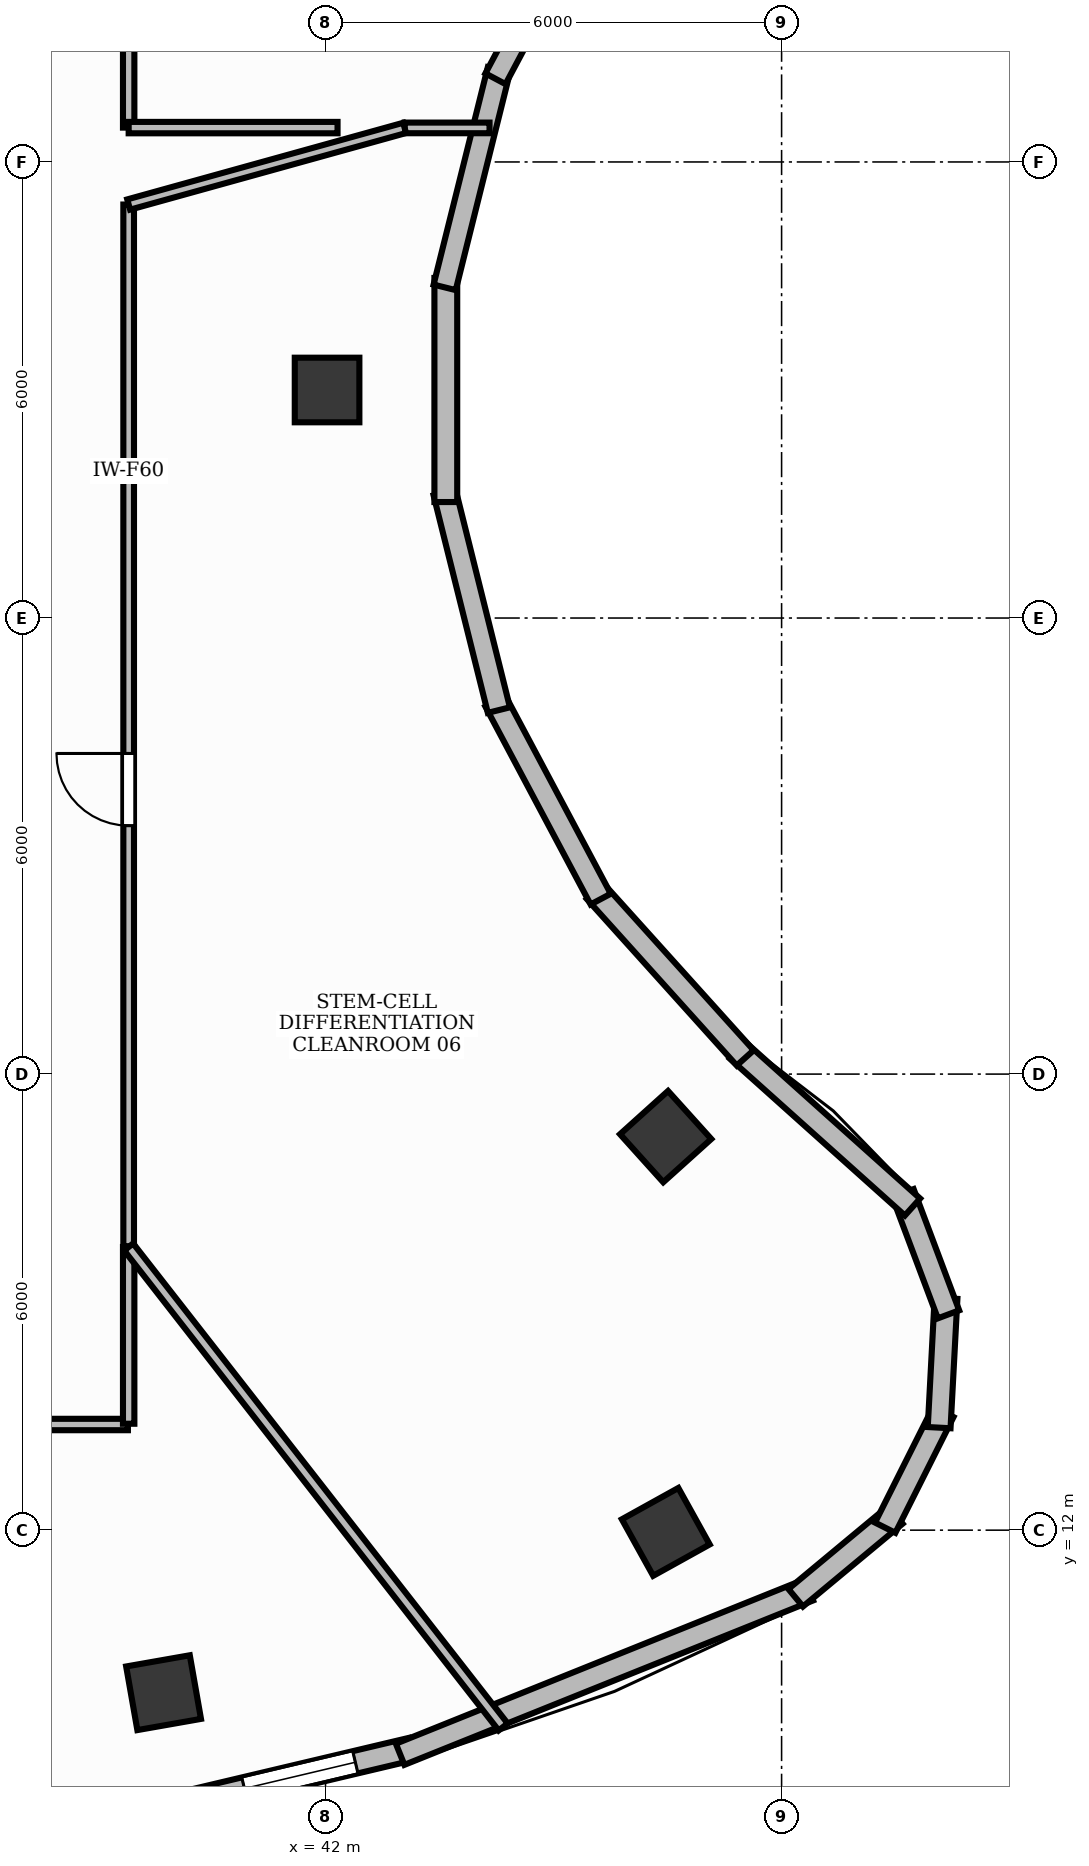
"""IFC4 building model, lengths in metres.
Left out: names, types, materials, properties, quantities, classifications, styles, units other than length and angle.
Written with IfcOpenShell. Run it as: python <this file> out.ifc"""

import sys

from ifc_helpers import new_model, si_unit, direction, frame, frame_2d, origin, origin_2d, place, context, subcontext, project, spatial, rectangle, extrude, element, fill, save


model = new_model("IFC4")
c1 = context("Model", 3, precision=1e-05, world=origin(), true_north=direction((0.0, 1.0)))
c2 = subcontext(c1, "Body", "Model", "MODEL_VIEW")
j1 = project(units=[si_unit("LENGTHUNIT", "METRE"), si_unit("PLANEANGLEUNIT", "RADIAN")], contexts=[c1])
p1 = place(None, origin())
s1 = spatial("IfcSite", under=j1, at=p1, CompositionType="ELEMENT")
p2 = place(p1, origin())
s2 = spatial("IfcBuilding", under=s1, at=p2, CompositionType="ELEMENT")
p3 = place(p2, frame((0.0, 0.0, 286.8)))
s3 = spatial("IfcBuildingStorey", under=s2, at=p3, CompositionType="ELEMENT", Elevation=286.8)
for number, where, z_axis, x_axis in (
    (1, (39.869, 9.862, -0.0), (0.0, 0.0, 1.0), (0.985, 0.173, 0.0)),
    (2, (46.476, 11.977, -0.0), (0.0, 0.0, 1.0), (0.875, 0.485, 0.0)),
    (3, (46.475, 17.177, -0.0), (0.0, 0.0, 1.0), (-0.669, 0.743, 0.0)),
    (4, (42.02, 27.0, -0.0), (0.0, 0.0, 1.0), (0.0, 1.0, 0.0)),
):
    element("IfcColumn", number, at=place(p3, frame(where, z_axis=z_axis, x_axis=x_axis)), inside=s3, PredefinedType="COLUMN", context=c2, shape_type="SweptSolid", body=[
        extrude(rectangle(XDim=0.85, YDim=0.85, at=origin_2d()), origin(), (0.0, 0.0, 1.0), 3.901),
    ])
p4 = place(p3, frame((40.196, 8.427, 0.0), z_axis=(0.0, 0.0, 1.0), x_axis=(0.9731008332, 0.230379618079, 0.0)))
e5 = element("IfcWall", 5, at=p4, inside=s3, PredefinedType="STANDARD", context=c2, shape_type="SweptSolid", body=[
    extrude(rectangle(XDim=3.015, YDim=0.3, at=frame_2d((1.507, 0.0))), origin(), (0.0, 0.0, 1.0), 3.9),
])
p5 = place(p4, frame((0.758, 0.0, 0.95)))
e6 = element("IfcOpeningElement", 6, at=p5, cuts=e5, PredefinedType="OPENING", context=c2, shape_type="SweptSolid", body=[
    extrude(rectangle(XDim=1.5, YDim=1.8, at=frame_2d((0.75, 0.9))), frame((0.0, 0.165, 0.0), z_axis=(0.0, -1.0, 0.0), x_axis=(1.0, 0.0, 0.0)), (0.0, 0.0, 1.0), 0.33),
])
p6 = place(p3, frame((42.981, 9.052, 0.0), z_axis=(0.0, 0.0, 1.0), x_axis=(0.927771967192, 0.373147660978, 0.0)))
e7 = element("IfcWall", 7, at=p6, inside=s3, PredefinedType="STANDARD", context=c2, shape_type="SweptSolid", body=[
    extrude(rectangle(XDim=5.796, YDim=0.3, at=frame_2d((2.898, 0.0))), origin(), (0.0, 0.0, 1.0), 3.9),
])
for number, where, z_axis, x_axis in (
    (8, (48.185, 11.111, 0.0), (0.0, 0.0, 1.0), (0.769, 0.639, 0.0)),
    (9, (49.363, 12.032, 0.0), (0.0, 0.0, 1.0), (0.449, 0.894, 0.0)),
):
    element("IfcWall", number, at=place(p3, frame(where, z_axis=z_axis, x_axis=x_axis)), inside=s3, PredefinedType="STANDARD", context=c2, shape_type="SweptSolid", body=[
        extrude(rectangle(XDim=1.704, YDim=0.3, at=frame_2d((0.852, 0.0))), origin(), (0.0, 0.0, 1.0), 3.9),
    ])
for number, where, z_axis, x_axis in (
    (10, (50.073, 13.349, 0.0), (0.0, 0.0, 1.0), (0.053, 0.999, 0.0)),
    (11, (50.196, 14.839, 0.0), (0.0, 0.0, 1.0), (-0.351, 0.936, 0.0)),
):
    element("IfcWall", number, at=place(p3, frame(where, z_axis=z_axis, x_axis=x_axis)), inside=s3, PredefinedType="STANDARD", context=c2, shape_type="SweptSolid", body=[
        extrude(rectangle(XDim=1.704, YDim=0.3, at=frame_2d((0.852, 0.0))), origin(), (0.0, 0.0, 1.0), 3.9),
    ])
p7 = place(p3, frame((49.722, 16.251, 0.0), z_axis=(0.0, 0.0, 1.0), x_axis=(-0.744720921046, 0.667376018266, 0.0)))
e12 = element("IfcWall", 12, at=p7, inside=s3, PredefinedType="STANDARD", context=c2, shape_type="SweptSolid", body=[
    extrude(rectangle(XDim=3.094, YDim=0.3, at=frame_2d((1.547, 0.0))), origin(), (0.0, 0.0, 1.0), 3.9),
])
p8 = place(p3, frame((47.521, 18.213, 0.0), z_axis=(0.0, 0.0, 1.0), x_axis=(-0.669166006669, 0.743112949368, 0.0)))
e13 = element("IfcWall", 13, at=p8, inside=s3, PredefinedType="STANDARD", context=c2, shape_type="SweptSolid", body=[
    extrude(rectangle(XDim=2.948, YDim=0.3, at=frame_2d((1.474, 0.0))), origin(), (0.0, 0.0, 1.0), 3.9),
])
p9 = place(p3, frame((45.62, 20.302, 0.0), z_axis=(0.0, 0.0, 1.0), x_axis=(-0.469466013123, 0.882950543644, 0.0)))
e14 = element("IfcWall", 14, at=p9, inside=s3, PredefinedType="STANDARD", context=c2, shape_type="SweptSolid", body=[
    extrude(rectangle(XDim=2.948, YDim=0.3, at=frame_2d((1.474, 0.0))), origin(), (0.0, 0.0, 1.0), 2.625),
])
p10 = place(p3, frame((44.281, 22.789, 0.0), z_axis=(0.0, 0.0, 1.0), x_axis=(-0.24195108751, 0.970288447449, 0.0)))
e15 = element("IfcWall", 15, at=p10, inside=s3, PredefinedType="STANDARD", context=c2, shape_type="SweptSolid", body=[
    extrude(rectangle(XDim=2.948, YDim=0.3, at=frame_2d((1.474, 0.0))), origin(), (0.0, 0.0, 1.0), 2.625),
])
p11 = place(p3, frame((43.583, 25.526, 0.0), z_axis=(0.0, 0.0, 1.0), x_axis=(0.0, 1.0, 0.0)))
e16 = element("IfcWall", 16, at=p11, inside=s3, PredefinedType="STANDARD", context=c2, shape_type="SweptSolid", body=[
    extrude(rectangle(XDim=2.948, YDim=0.3, at=frame_2d((1.474, 0.0))), origin(), (0.0, 0.0, 1.0), 3.9),
])
p12 = place(p3, frame((43.567, 28.35, 0.0), z_axis=(0.0, 0.0, 1.0), x_axis=(0.24195108751, 0.970288447449, 0.0)))
e17 = element("IfcWall", 17, at=p12, inside=s3, PredefinedType="STANDARD", context=c2, shape_type="SweptSolid", body=[
    extrude(rectangle(XDim=2.948, YDim=0.3, at=frame_2d((1.474, 0.0))), origin(), (0.0, 0.0, 1.0), 2.625),
])
p13 = place(p3, frame((44.236, 31.095, 0.0), z_axis=(0.0, 0.0, 1.0), x_axis=(0.469466013123, 0.882950543644, 0.0)))
e18 = element("IfcWall", 18, at=p13, inside=s3, PredefinedType="STANDARD", context=c2, shape_type="SweptSolid", body=[
    extrude(rectangle(XDim=2.948, YDim=0.3, at=frame_2d((1.474, 0.0))), origin(), (0.0, 0.0, 1.0), 2.625),
])
p14 = place(p3, frame((33.708, 13.39, 0.0), z_axis=(0.0, 0.0, 1.0), x_axis=(1.0, 0.0, 0.0)))
e19 = element("IfcWall", 19, at=p14, inside=s3, PredefinedType="PARTITIONING", context=c2, shape_type="SweptSolid", body=[
    extrude(rectangle(XDim=5.692, YDim=0.15, at=frame_2d((2.846, 0.0))), origin(), (0.0, 0.0, 1.0), 2.22),
])
p15 = place(p14, frame((0.429, 0.0, 0.0)))
e20 = element("IfcOpeningElement", 20, at=p15, cuts=e19, PredefinedType="OPENING", context=c2, shape_type="SweptSolid", body=[
    extrude(rectangle(XDim=0.95, YDim=2.15, at=frame_2d((0.475, 1.075))), frame((0.0, 0.09, 0.0), z_axis=(0.0, -1.0, 0.0), x_axis=(1.0, 0.0, 0.0)), (0.0, 0.0, 1.0), 0.18),
])
p16 = place(p3, frame((39.41, 15.736, 0.0), z_axis=(0.0, 0.0, 1.0), x_axis=(0.0, 1.0, 0.0)))
e21 = element("IfcWall", 21, at=p16, inside=s3, PredefinedType="PARTITIONING", context=c2, shape_type="SweptSolid", body=[
    extrude(rectangle(XDim=13.704, YDim=0.14, at=frame_2d((6.852, 0.0))), origin(), (0.0, 0.0, 1.0), 2.22),
])
p17 = place(p16, frame((5.533, 0.0, 0.0)))
e22 = element("IfcOpeningElement", 22, at=p17, cuts=e21, PredefinedType="OPENING", context=c2, shape_type="SweptSolid", body=[
    extrude(rectangle(XDim=0.95, YDim=2.15, at=frame_2d((0.475, 1.075))), frame((0.0, 0.085, 0.0), z_axis=(0.0, -1.0, 0.0), x_axis=(1.0, 0.0, 0.0)), (0.0, 0.0, 1.0), 0.17),
])
p18 = place(p3, frame((39.41, 30.452, 0.0), z_axis=(0.0, 0.0, 1.0), x_axis=(0.0, 1.0, 0.0)))
e23 = element("IfcWall", 23, at=p18, inside=s3, PredefinedType="PARTITIONING", context=c2, shape_type="SweptSolid", body=[
    extrude(rectangle(XDim=10.298, YDim=0.15, at=frame_2d((5.149, 0.0))), origin(), (0.0, 0.0, 1.0), 2.22),
])
p19 = place(p18, frame((8.684, 0.0, 0.0)))
e24 = element("IfcOpeningElement", 24, at=p19, cuts=e23, PredefinedType="OPENING", context=c2, shape_type="SweptSolid", body=[
    extrude(rectangle(XDim=0.95, YDim=2.15, at=frame_2d((0.475, 1.075))), frame((0.0, 0.09, 0.0), z_axis=(0.0, -1.0, 0.0), x_axis=(1.0, 0.0, 0.0)), (0.0, 0.0, 1.0), 0.18),
])
p20 = place(p3, frame((39.41, 13.4, 0.0), z_axis=(0.0, 0.0, 1.0), x_axis=(0.0, 1.0, 0.0)))
e25 = element("IfcWall", 25, at=p20, inside=s3, PredefinedType="PARTITIONING", context=c2, shape_type="SweptSolid", body=[
    extrude(rectangle(XDim=2.326, YDim=0.15, at=frame_2d((1.163, 0.0))), origin(), (0.0, 0.0, 1.0), 2.22),
])
p21 = place(p3, frame((39.41, 15.726, 0.0), z_axis=(0.0, 0.0, 1.0), x_axis=(0.615180754192, -0.788386098096, 0.0)))
e26 = element("IfcWall", 26, at=p21, inside=s3, PredefinedType="PARTITIONING", context=c2, shape_type="SweptSolid", body=[
    extrude(rectangle(XDim=8.009, YDim=0.15, at=frame_2d((4.004, 0.0))), origin(), (0.0, 0.0, 1.0), 2.22),
])
p22 = place(p3, frame((43.041, 30.448, 0.0), z_axis=(0.0, 0.0, 1.0), x_axis=(1.0, 0.0, 0.0)))
e27 = element("IfcWall", 27, at=p22, inside=s3, PredefinedType="PARTITIONING", context=c2, shape_type="SweptSolid", body=[
    extrude(rectangle(XDim=1.116, YDim=0.14, at=frame_2d((0.558, 0.0))), origin(), (0.0, 0.0, 1.0), 2.22),
])
p23 = place(p3, frame((39.41, 29.44, 0.0), z_axis=(0.0, 0.0, 1.0), x_axis=(0.963548536489, 0.267533582621, 0.0)))
e28 = element("IfcWall", 28, at=p23, inside=s3, PredefinedType="PARTITIONING", context=c2, shape_type="SweptSolid", body=[
    extrude(rectangle(XDim=3.768, YDim=0.14, at=frame_2d((1.884, 0.0))), origin(), (0.0, 0.0, 1.0), 2.22),
])
p24 = place(p3, frame((42.158, 30.452, 0.0), z_axis=(0.0, 0.0, 1.0), x_axis=(-1.0, 0.0, 0.0)))
e29 = element("IfcWall", 29, at=p24, inside=s3, PredefinedType="PARTITIONING", context=c2, shape_type="SweptSolid", body=[
    extrude(rectangle(XDim=2.748, YDim=0.15, at=frame_2d((1.374, 0.0))), origin(), (0.0, 0.0, 1.0), 2.22),
])
p25 = place(p5, origin())
e30 = element("IfcWindow", 30, at=p25, inside=s3, PartitioningType="DOUBLE_PANEL_VERTICAL", PredefinedType="WINDOW", context=c2, shape_type="SweptSolid", body=[
    extrude(rectangle(XDim=1.5, YDim=1.8, at=frame_2d((0.75, 0.9))), frame((0.0, 0.03, 0.0), z_axis=(0.0, -1.0, 0.0), x_axis=(1.0, 0.0, 0.0)), (0.0, 0.0, 1.0), 0.06),
])
fill(e6, e30)
p26 = place(p17, origin())
e31 = element("IfcDoor", 31, at=p26, inside=s3, OperationType="SINGLE_SWING_RIGHT", PredefinedType="DOOR", context=c2, shape_type="SweptSolid", body=[
    extrude(rectangle(XDim=0.95, YDim=2.15, at=frame_2d((0.475, 1.075))), frame((0.0, 0.025, 0.0), z_axis=(0.0, -1.0, 0.0), x_axis=(1.0, 0.0, 0.0)), (0.0, 0.0, 1.0), 0.05),
])
fill(e22, e31)
save(model, sys.argv[1])
